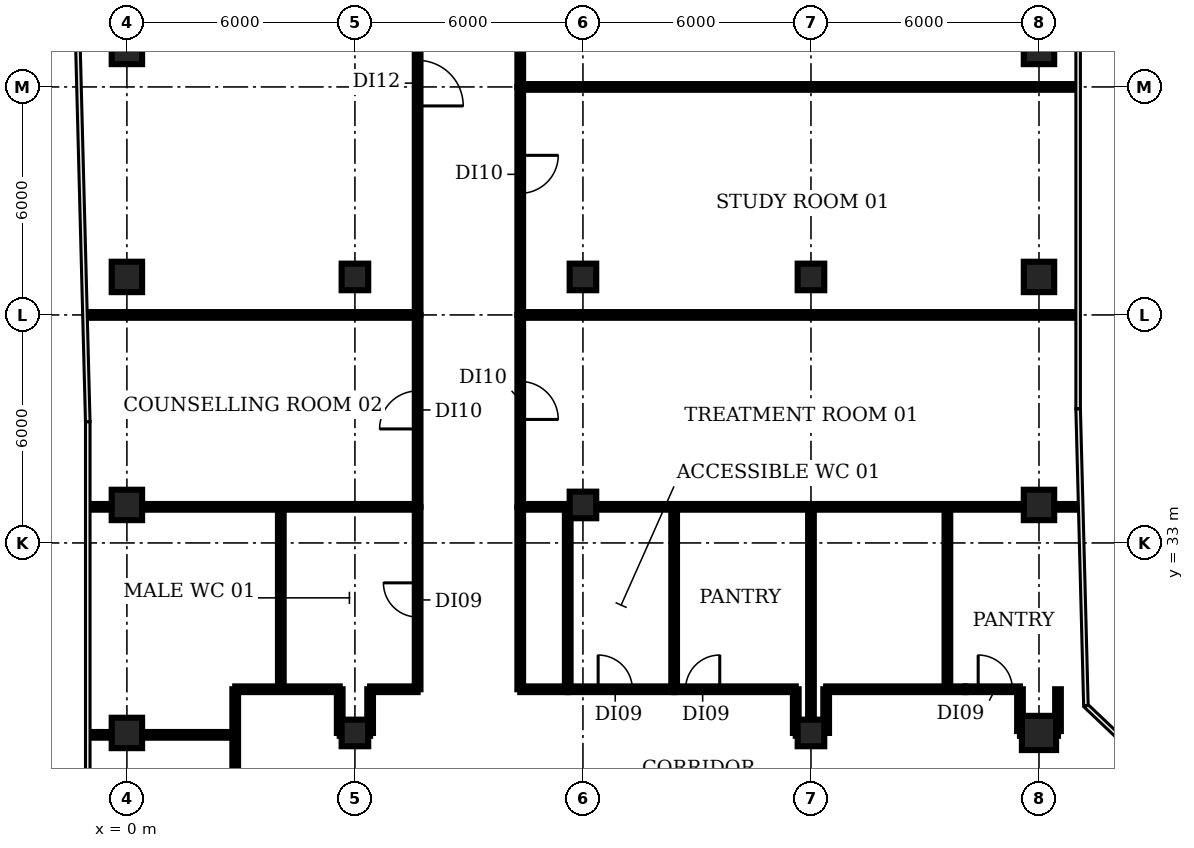
"""IFC4 building model, lengths in metres.
Left out: names, types, materials, properties, quantities, classifications, styles, units other than length and angle.
Written with IfcOpenShell. Run it as: python <this file> out.ifc"""

import sys

from ifc_helpers import new_model, si_unit, direction, frame, frame_2d, origin, origin_2d, place, context, subcontext, project, spatial, rectangle, circle, extrude, element, fill, save


model = new_model("IFC4")
c1 = context("Model", 3, precision=1e-05, world=origin(), true_north=direction((0.0, 1.0)))
c2 = subcontext(c1, "Body", "Model", "MODEL_VIEW")
j1 = project(units=[si_unit("LENGTHUNIT", "METRE"), si_unit("PLANEANGLEUNIT", "RADIAN")], contexts=[c1])
p1 = place(None, origin())
s1 = spatial("IfcSite", under=j1, at=p1, CompositionType="ELEMENT")
p2 = place(p1, origin())
s2 = spatial("IfcBuilding", under=s1, at=p2, CompositionType="ELEMENT")
p3 = place(p2, frame((0.0, 0.0, 222.2)))
s3 = spatial("IfcBuildingStorey", under=s2, at=p3, CompositionType="ELEMENT", Elevation=222.2)
for number, where, z_axis, x_axis in (
    (1, (0.0, 28.0, 0.0), (0.0, 0.0, 1.0), (1.0, 0.0, 0.0)),
    (2, (0.0, 34.0, 0.0), (0.0, 0.0, 1.0), (1.0, 0.0, 0.0)),
    (3, (0.0, 40.0, 0.0), (0.0, 0.0, 1.0), (1.0, 0.0, 0.0)),
    (4, (0.0, 46.0, 0.0), (0.0, 0.0, 1.0), (1.0, 0.0, 0.0)),
):
    element("IfcColumn", number, at=place(p3, frame(where, z_axis=z_axis, x_axis=x_axis)), inside=s3, PredefinedType="COLUMN", context=c2, shape_type="SweptSolid", body=[
        extrude(rectangle(XDim=0.8, YDim=0.8, at=origin_2d()), origin(), (0.0, 0.0, 1.0), 3.85),
    ])
for number, where, z_axis, x_axis in (
    (5, (6.0, 28.0, 0.0), (0.0, 0.0, 1.0), (1.0, 0.0, 0.0)),
    (6, (6.0, 40.0, 0.0), (0.0, 0.0, 1.0), (1.0, 0.0, 0.0)),
    (7, (12.0, 34.0, 0.0), (0.0, 0.0, 1.0), (1.0, 0.0, 0.0)),
    (8, (12.0, 40.0, 0.0), (0.0, 0.0, 1.0), (1.0, 0.0, 0.0)),
    (9, (18.0, 28.0, 0.0), (0.0, 0.0, 1.0), (1.0, 0.0, 0.0)),
    (10, (18.0, 40.0, 0.0), (0.0, 0.0, 1.0), (1.0, 0.0, 0.0)),
):
    element("IfcColumn", number, at=place(p3, frame(where, z_axis=z_axis, x_axis=x_axis)), inside=s3, PredefinedType="COLUMN", context=c2, shape_type="SweptSolid", body=[
        extrude(rectangle(XDim=0.7, YDim=0.7, at=origin_2d()), origin(), (0.0, 0.0, 1.0), 3.85),
    ])
p4 = place(p3, frame((24.0, 28.0, 0.0), z_axis=(0.0, 0.0, 1.0), x_axis=(1.0, 0.0, 0.0)))
e11 = element("IfcColumn", 11, at=p4, inside=s3, PredefinedType="COLUMN", context=c2, shape_type="SweptSolid", body=[
    extrude(circle(Radius=0.45, at=origin_2d()), origin(), (0.0, 0.0, 1.0), 3.85),
])
for number, where, z_axis, x_axis in (
    (12, (24.0, 34.0, 0.0), (0.0, 0.0, 1.0), (1.0, 0.0, 0.0)),
    (13, (24.0, 40.0, 0.0), (0.0, 0.0, 1.0), (1.0, 0.0, 0.0)),
    (14, (24.0, 46.0, 0.0), (0.0, 0.0, 1.0), (1.0, 0.0, 0.0)),
):
    element("IfcColumn", number, at=place(p3, frame(where, z_axis=z_axis, x_axis=x_axis)), inside=s3, PredefinedType="COLUMN", context=c2, shape_type="SweptSolid", body=[
        extrude(rectangle(XDim=0.8, YDim=0.8, at=origin_2d()), origin(), (0.0, 0.0, 1.0), 3.85),
    ])
p5 = place(p3, frame((-1.05, 39.0, 0.0), z_axis=(0.0, 0.0, 1.0), x_axis=(1.0, 0.0, 0.0)))
e15 = element("IfcWall", 15, at=p5, inside=s3, PredefinedType="PARTITIONING", context=c2, shape_type="SweptSolid", body=[
    extrude(rectangle(XDim=8.7, YDim=0.15, at=frame_2d((4.35, 0.0))), origin(), (0.0, 0.0, 1.0), 2.88),
])
p6 = place(p3, frame((-0.98, 27.95, 0.0), z_axis=(0.0, 0.0, 1.0), x_axis=(1.0, 0.0, 0.0)))
e16 = element("IfcWall", 16, at=p6, inside=s3, PredefinedType="PARTITIONING", context=c2, shape_type="SweptSolid", body=[
    extrude(rectangle(XDim=3.83, YDim=0.15, at=frame_2d((1.915, 0.0))), origin(), (0.0, 0.0, 1.0), 2.88),
])
p7 = place(p3, frame((-0.98, 33.95, 0.0), z_axis=(0.0, 0.0, 1.0), x_axis=(1.0, 0.0, 0.0)))
e17 = element("IfcWall", 17, at=p7, inside=s3, PredefinedType="PARTITIONING", context=c2, shape_type="SweptSolid", body=[
    extrude(rectangle(XDim=8.63, YDim=0.15, at=frame_2d((4.315, 0.0))), origin(), (0.0, 0.0, 1.0), 2.88),
])
p8 = place(p3, frame((2.85, 25.25, 0.0), z_axis=(0.0, 0.0, 1.0), x_axis=(0.0, 1.0, 0.0)))
e18 = element("IfcWall", 18, at=p8, inside=s3, PredefinedType="PARTITIONING", context=c2, shape_type="SweptSolid", body=[
    extrude(rectangle(XDim=3.9, YDim=0.15, at=frame_2d((1.95, 0.0))), origin(), (0.0, 0.0, 1.0), 2.88),
])
p9 = place(p3, frame((2.85, 29.15, 0.0), z_axis=(0.0, 0.0, 1.0), x_axis=(1.0, 0.0, 0.0)))
e19 = element("IfcWall", 19, at=p9, inside=s3, PredefinedType="PARTITIONING", context=c2, shape_type="SweptSolid", body=[
    extrude(rectangle(XDim=2.75, YDim=0.15, at=frame_2d((1.375, 0.0))), origin(), (0.0, 0.0, 1.0), 2.88),
])
p10 = place(p3, frame((4.05, 29.15, 0.0), z_axis=(0.0, 0.0, 1.0), x_axis=(0.0, 1.0, 0.0)))
e20 = element("IfcWall", 20, at=p10, inside=s3, PredefinedType="PARTITIONING", context=c2, shape_type="SweptSolid", body=[
    extrude(rectangle(XDim=4.8, YDim=0.15, at=frame_2d((2.4, 0.0))), origin(), (0.0, 0.0, 1.0), 2.88),
])
p11 = place(p3, frame((5.6, 28.0, 0.0), z_axis=(0.0, 0.0, 1.0), x_axis=(0.0, 1.0, 0.0)))
e21 = element("IfcWall", 21, at=p11, inside=s3, PredefinedType="PARTITIONING", context=c2, shape_type="SweptSolid", body=[
    extrude(rectangle(XDim=1.15, YDim=0.15, at=frame_2d((0.575, 0.0))), origin(), (0.0, 0.0, 1.0), 2.88),
])
p12 = place(p3, frame((5.6, 28.0, 0.0), z_axis=(0.0, 0.0, 1.0), x_axis=(1.0, 0.0, 0.0)))
e22 = element("IfcWall", 22, at=p12, inside=s3, PredefinedType="PARTITIONING", context=c2, shape_type="SweptSolid", body=[
    extrude(rectangle(XDim=0.8, YDim=0.15, at=frame_2d((0.4, 0.0))), origin(), (0.0, 0.0, 1.0), 2.88),
])
p13 = place(p3, frame((6.4, 28.0, 0.0), z_axis=(0.0, 0.0, 1.0), x_axis=(0.0, 1.0, 0.0)))
e23 = element("IfcWall", 23, at=p13, inside=s3, PredefinedType="PARTITIONING", context=c2, shape_type="SweptSolid", body=[
    extrude(rectangle(XDim=1.15, YDim=0.15, at=frame_2d((0.575, 0.0))), origin(), (0.0, 0.0, 1.0), 2.88),
])
p14 = place(p3, frame((6.4, 29.15, 0.0), z_axis=(0.0, 0.0, 1.0), x_axis=(1.0, 0.0, 0.0)))
e24 = element("IfcWall", 24, at=p14, inside=s3, PredefinedType="PARTITIONING", context=c2, shape_type="SweptSolid", body=[
    extrude(rectangle(XDim=1.25, YDim=0.15, at=frame_2d((0.625, 0.0))), origin(), (0.0, 0.0, 1.0), 2.88),
])
p15 = place(p3, frame((7.65, 29.15, 0.0), z_axis=(0.0, 0.0, 1.0), x_axis=(0.0, 1.0, 0.0)))
e25 = element("IfcWall", 25, at=p15, inside=s3, PredefinedType="PARTITIONING", context=c2, shape_type="SweptSolid", body=[
    extrude(rectangle(XDim=4.8, YDim=0.15, at=frame_2d((2.4, 0.0))), origin(), (0.0, 0.0, 1.0), 2.88),
])
p16 = place(p15, frame((1.9, 0.0, 0.0)))
e26 = element("IfcOpeningElement", 26, at=p16, cuts=e25, PredefinedType="OPENING", context=c2, shape_type="SweptSolid", body=[
    extrude(rectangle(XDim=0.9, YDim=2.1, at=frame_2d((0.45, 1.05))), frame((0.0, 0.085, 0.0), z_axis=(0.0, -1.0, 0.0), x_axis=(1.0, 0.0, 0.0)), (0.0, 0.0, 1.0), 0.17),
])
p17 = place(p3, frame((7.65, 33.95, 0.0), z_axis=(0.0, 0.0, 1.0), x_axis=(0.0, 1.0, 0.0)))
e27 = element("IfcWall", 27, at=p17, inside=s3, PredefinedType="PARTITIONING", context=c2, shape_type="SweptSolid", body=[
    extrude(rectangle(XDim=5.05, YDim=0.15, at=frame_2d((2.525, 0.0))), origin(), (0.0, 0.0, 1.0), 2.88),
])
p18 = place(p17, frame((2.05, 0.0, 0.0)))
e28 = element("IfcOpeningElement", 28, at=p18, cuts=e27, PredefinedType="OPENING", context=c2, shape_type="SweptSolid", body=[
    extrude(rectangle(XDim=1.0, YDim=2.1, at=frame_2d((0.5, 1.05))), frame((0.0, 0.085, 0.0), z_axis=(0.0, -1.0, 0.0), x_axis=(1.0, 0.0, 0.0)), (0.0, 0.0, 1.0), 0.17),
])
p19 = place(p3, frame((7.65, 51.0, 0.0), z_axis=(0.0, 0.0, 1.0), x_axis=(0.0, -1.0, 0.0)))
e29 = element("IfcWall", 29, at=p19, inside=s3, PredefinedType="PARTITIONING", context=c2, shape_type="SweptSolid", body=[
    extrude(rectangle(XDim=12.0, YDim=0.15, at=frame_2d((6.0, 0.0))), origin(), (0.0, 0.0, 1.0), 2.88),
])
p20 = place(p19, frame((5.3, 0.0, 0.0)))
e30 = element("IfcOpeningElement", 30, at=p20, cuts=e29, PredefinedType="OPENING", context=c2, shape_type="SweptSolid", body=[
    extrude(rectangle(XDim=1.2, YDim=2.1, at=frame_2d((0.6, 1.05))), frame((0.0, 0.085, 0.0), z_axis=(0.0, -1.0, 0.0), x_axis=(1.0, 0.0, 0.0)), (0.0, 0.0, 1.0), 0.17),
])
p21 = place(p3, frame((10.35, 29.15, 0.0), z_axis=(0.0, 0.0, 1.0), x_axis=(0.0, 1.0, 0.0)))
e31 = element("IfcWall", 31, at=p21, inside=s3, PredefinedType="PARTITIONING", context=c2, shape_type="SweptSolid", body=[
    extrude(rectangle(XDim=4.8, YDim=0.15, at=frame_2d((2.4, 0.0))), origin(), (0.0, 0.0, 1.0), 2.88),
])
p22 = place(p3, frame((10.35, 29.15, 0.0), z_axis=(0.0, 0.0, 1.0), x_axis=(1.0, 0.0, 0.0)))
e32 = element("IfcWall", 32, at=p22, inside=s3, PredefinedType="PARTITIONING", context=c2, shape_type="SweptSolid", body=[
    extrude(rectangle(XDim=1.25, YDim=0.15, at=frame_2d((0.625, 0.0))), origin(), (0.0, 0.0, 1.0), 2.88),
])
p23 = place(p3, frame((10.35, 33.95, 0.0), z_axis=(0.0, 0.0, 1.0), x_axis=(1.0, 0.0, 0.0)))
e33 = element("IfcWall", 33, at=p23, inside=s3, PredefinedType="PARTITIONING", context=c2, shape_type="SweptSolid", body=[
    extrude(rectangle(XDim=1.242, YDim=0.15, at=frame_2d((0.621, 0.0))), origin(), (0.0, 0.0, 1.0), 2.88),
])
p24 = place(p3, frame((10.35, 39.0, 0.0), z_axis=(0.0, 0.0, 1.0), x_axis=(0.0, -1.0, 0.0)))
e34 = element("IfcWall", 34, at=p24, inside=s3, PredefinedType="PARTITIONING", context=c2, shape_type="SweptSolid", body=[
    extrude(rectangle(XDim=5.05, YDim=0.15, at=frame_2d((2.525, 0.0))), origin(), (0.0, 0.0, 1.0), 2.88),
])
p25 = place(p24, frame((1.75, 0.0, 0.0)))
e35 = element("IfcOpeningElement", 35, at=p25, cuts=e34, PredefinedType="OPENING", context=c2, shape_type="SweptSolid", body=[
    extrude(rectangle(XDim=1.0, YDim=2.1, at=frame_2d((0.5, 1.05))), frame((0.0, 0.085, 0.0), z_axis=(0.0, -1.0, 0.0), x_axis=(1.0, 0.0, 0.0)), (0.0, 0.0, 1.0), 0.17),
])
p26 = place(p3, frame((10.35, 39.0, 0.0), z_axis=(0.0, 0.0, 1.0), x_axis=(1.0, 0.0, 0.0)))
e36 = element("IfcWall", 36, at=p26, inside=s3, PredefinedType="PARTITIONING", context=c2, shape_type="SweptSolid", body=[
    extrude(rectangle(XDim=14.63, YDim=0.15, at=frame_2d((7.315, 0.0))), origin(), (0.0, 0.0, 1.0), 2.88),
])
p27 = place(p3, frame((10.35, 45.0, 0.0), z_axis=(0.0, 0.0, 1.0), x_axis=(0.0, -1.0, 0.0)))
e37 = element("IfcWall", 37, at=p27, inside=s3, PredefinedType="PARTITIONING", context=c2, shape_type="SweptSolid", body=[
    extrude(rectangle(XDim=6.0, YDim=0.15, at=frame_2d((3.0, 0.0))), origin(), (0.0, 0.0, 1.0), 2.88),
])
p28 = place(p27, frame((1.8, 0.0, 0.0)))
e38 = element("IfcOpeningElement", 38, at=p28, cuts=e37, PredefinedType="OPENING", context=c2, shape_type="SweptSolid", body=[
    extrude(rectangle(XDim=1.0, YDim=2.1, at=frame_2d((0.5, 1.05))), frame((0.0, 0.085, 0.0), z_axis=(0.0, -1.0, 0.0), x_axis=(1.0, 0.0, 0.0)), (0.0, 0.0, 1.0), 0.17),
])
p29 = place(p3, frame((10.35, 45.0, 0.0), z_axis=(0.0, 0.0, 1.0), x_axis=(0.0, 1.0, 0.0)))
e39 = element("IfcWall", 39, at=p29, inside=s3, PredefinedType="PARTITIONING", context=c2, shape_type="SweptSolid", body=[
    extrude(rectangle(XDim=12.0, YDim=0.15, at=frame_2d((6.0, 0.0))), origin(), (0.0, 0.0, 1.0), 2.88),
])
p30 = place(p29, frame((5.3, 0.0, 0.0)))
e40 = element("IfcOpeningElement", 40, at=p30, cuts=e39, PredefinedType="OPENING", context=c2, shape_type="SweptSolid", body=[
    extrude(rectangle(XDim=1.2, YDim=2.1, at=frame_2d((0.6, 1.05))), frame((0.0, 0.085, 0.0), z_axis=(0.0, -1.0, 0.0), x_axis=(1.0, 0.0, 0.0)), (0.0, 0.0, 1.0), 0.17),
])
p31 = place(p3, frame((10.35, 45.0, 0.0), z_axis=(0.0, 0.0, 1.0), x_axis=(1.0, 0.0, 0.0)))
e41 = element("IfcWall", 41, at=p31, inside=s3, PredefinedType="PARTITIONING", context=c2, shape_type="SweptSolid", body=[
    extrude(rectangle(XDim=14.63, YDim=0.15, at=frame_2d((7.315, 0.0))), origin(), (0.0, 0.0, 1.0), 2.88),
])
p32 = place(p3, frame((11.6, 29.15, 0.0), z_axis=(0.0, 0.0, 1.0), x_axis=(0.0, 1.0, 0.0)))
e42 = element("IfcWall", 42, at=p32, inside=s3, PredefinedType="PARTITIONING", context=c2, shape_type="SweptSolid", body=[
    extrude(rectangle(XDim=4.72, YDim=0.15, at=frame_2d((2.36, 0.0))), origin(), (0.0, 0.0, 1.0), 2.88),
])
p33 = place(p3, frame((11.6, 29.15, 0.0), z_axis=(0.0, 0.0, 1.0), x_axis=(1.0, 0.0, 0.0)))
e43 = element("IfcWall", 43, at=p33, inside=s3, PredefinedType="PARTITIONING", context=c2, shape_type="SweptSolid", body=[
    extrude(rectangle(XDim=2.8, YDim=0.15, at=frame_2d((1.4, 0.0))), origin(), (0.0, 0.0, 1.0), 2.88),
])
p34 = place(p33, frame((0.8, 0.0, 0.0)))
e44 = element("IfcOpeningElement", 44, at=p34, cuts=e43, PredefinedType="OPENING", context=c2, shape_type="SweptSolid", body=[
    extrude(rectangle(XDim=0.9, YDim=2.1, at=frame_2d((0.45, 1.05))), frame((0.0, 0.085, 0.0), z_axis=(0.0, -1.0, 0.0), x_axis=(1.0, 0.0, 0.0)), (0.0, 0.0, 1.0), 0.17),
])
p35 = place(p3, frame((11.696, 33.95, 0.0), z_axis=(0.0, 0.0, 1.0), x_axis=(1.0, 0.0, 0.0)))
e45 = element("IfcWall", 45, at=p35, inside=s3, PredefinedType="PARTITIONING", context=c2, shape_type="SweptSolid", body=[
    extrude(rectangle(XDim=0.621, YDim=0.15, at=frame_2d((0.311, 0.0))), origin(), (0.0, 0.0, 1.0), 2.88),
])
p36 = place(p3, frame((12.42, 33.95, 0.0), z_axis=(0.0, 0.0, 1.0), x_axis=(1.0, 0.0, 0.0)))
e46 = element("IfcWall", 46, at=p36, inside=s3, PredefinedType="PARTITIONING", context=c2, shape_type="SweptSolid", body=[
    extrude(rectangle(XDim=12.63, YDim=0.15, at=frame_2d((6.315, 0.0))), origin(), (0.0, 0.0, 1.0), 2.88),
])
p37 = place(p3, frame((14.4, 29.15, 0.0), z_axis=(0.0, 0.0, 1.0), x_axis=(0.0, 1.0, 0.0)))
e47 = element("IfcWall", 47, at=p37, inside=s3, PredefinedType="PARTITIONING", context=c2, shape_type="SweptSolid", body=[
    extrude(rectangle(XDim=4.8, YDim=0.15, at=frame_2d((2.4, 0.0))), origin(), (0.0, 0.0, 1.0), 2.88),
])
p38 = place(p3, frame((14.4, 29.15, 0.0), z_axis=(0.0, 0.0, 1.0), x_axis=(1.0, 0.0, 0.0)))
e48 = element("IfcWall", 48, at=p38, inside=s3, PredefinedType="PARTITIONING", context=c2, shape_type="SweptSolid", body=[
    extrude(rectangle(XDim=3.2, YDim=0.15, at=frame_2d((1.6, 0.0))), origin(), (0.0, 0.0, 1.0), 2.88),
])
p39 = place(p38, frame((0.3, 0.0, 0.0)))
e49 = element("IfcOpeningElement", 49, at=p39, cuts=e48, PredefinedType="OPENING", context=c2, shape_type="SweptSolid", body=[
    extrude(rectangle(XDim=0.9, YDim=2.1, at=frame_2d((0.45, 1.05))), frame((0.0, 0.085, 0.0), z_axis=(0.0, -1.0, 0.0), x_axis=(1.0, 0.0, 0.0)), (0.0, 0.0, 1.0), 0.17),
])
p40 = place(p3, frame((17.6, 28.0, 0.0), z_axis=(0.0, 0.0, 1.0), x_axis=(0.0, 1.0, 0.0)))
e50 = element("IfcWall", 50, at=p40, inside=s3, PredefinedType="PARTITIONING", context=c2, shape_type="SweptSolid", body=[
    extrude(rectangle(XDim=1.15, YDim=0.15, at=frame_2d((0.575, 0.0))), origin(), (0.0, 0.0, 1.0), 2.88),
])
p41 = place(p3, frame((17.6, 28.0, 0.0), z_axis=(0.0, 0.0, 1.0), x_axis=(1.0, 0.0, 0.0)))
e51 = element("IfcWall", 51, at=p41, inside=s3, PredefinedType="PARTITIONING", context=c2, shape_type="SweptSolid", body=[
    extrude(rectangle(XDim=0.4, YDim=0.15, at=frame_2d((0.2, 0.0))), origin(), (0.0, 0.0, 1.0), 2.88),
])
p42 = place(p3, frame((18.0, 28.0, 0.0), z_axis=(0.0, 0.0, 1.0), x_axis=(0.0, 1.0, 0.0)))
e52 = element("IfcWall", 52, at=p42, inside=s3, PredefinedType="PARTITIONING", context=c2, shape_type="SweptSolid", body=[
    extrude(rectangle(XDim=5.95, YDim=0.15, at=frame_2d((2.975, 0.0))), origin(), (0.0, 0.0, 1.0), 2.88),
])
p43 = place(p3, frame((18.4, 28.0, 0.0), z_axis=(0.0, 0.0, 1.0), x_axis=(0.0, 1.0, 0.0)))
e53 = element("IfcWall", 53, at=p43, inside=s3, PredefinedType="PARTITIONING", context=c2, shape_type="SweptSolid", body=[
    extrude(rectangle(XDim=1.15, YDim=0.15, at=frame_2d((0.575, 0.0))), origin(), (0.0, 0.0, 1.0), 2.88),
])
p44 = place(p3, frame((18.4, 29.15, 0.0), z_axis=(0.0, 0.0, 1.0), x_axis=(1.0, 0.0, 0.0)))
e54 = element("IfcWall", 54, at=p44, inside=s3, PredefinedType="PARTITIONING", context=c2, shape_type="SweptSolid", body=[
    extrude(rectangle(XDim=3.67, YDim=0.15, at=frame_2d((1.835, 0.0))), origin(), (0.0, 0.0, 1.0), 2.88),
])
p45 = place(p3, frame((21.59, 29.15, 0.0), z_axis=(0.0, 0.0, 1.0), x_axis=(0.0, 1.0, 0.0)))
e55 = element("IfcWall", 55, at=p45, inside=s3, PredefinedType="PARTITIONING", context=c2, shape_type="SweptSolid", body=[
    extrude(rectangle(XDim=4.8, YDim=0.15, at=frame_2d((2.4, 0.0))), origin(), (0.0, 0.0, 1.0), 2.88),
])
p46 = place(p3, frame((22.07, 29.15, 0.0), z_axis=(0.0, 0.0, 1.0), x_axis=(1.0, 0.0, 0.0)))
e56 = element("IfcWall", 56, at=p46, inside=s3, PredefinedType="PARTITIONING", context=c2, shape_type="SweptSolid", body=[
    extrude(rectangle(XDim=1.43, YDim=0.15, at=frame_2d((0.715, 0.0))), origin(), (0.0, 0.0, 1.0), 2.88),
])
p47 = place(p46, frame((0.33, 0.0, 0.0)))
e57 = element("IfcOpeningElement", 57, at=p47, cuts=e56, PredefinedType="OPENING", context=c2, shape_type="SweptSolid", body=[
    extrude(rectangle(XDim=0.9, YDim=2.1, at=frame_2d((0.45, 1.05))), frame((0.0, 0.085, 0.0), z_axis=(0.0, -1.0, 0.0), x_axis=(1.0, 0.0, 0.0)), (0.0, 0.0, 1.0), 0.17),
])
p48 = place(p3, frame((23.5, 28.0, 0.0), z_axis=(0.0, 0.0, 1.0), x_axis=(1.0, 0.0, 0.0)))
e58 = element("IfcWall", 58, at=p48, inside=s3, PredefinedType="PARTITIONING", context=c2, shape_type="SweptSolid", body=[
    extrude(rectangle(XDim=1.0, YDim=0.15, at=frame_2d((0.5, 0.0))), origin(), (0.0, 0.0, 1.0), 2.88),
])
for number, where, z_axis, x_axis in (
    (59, (23.5, 28.05, 0.0), (0.0, 0.0, 1.0), (0.0, 1.0, 0.0)),
    (60, (24.5, 28.05, 0.0), (0.0, 0.0, 1.0), (0.0, 1.0, 0.0)),
):
    element("IfcWall", number, at=place(p3, frame(where, z_axis=z_axis, x_axis=x_axis)), inside=s3, PredefinedType="PARTITIONING", context=c2, shape_type="SweptSolid", body=[
        extrude(rectangle(XDim=1.1, YDim=0.15, at=frame_2d((0.55, 0.0))), origin(), (0.0, 0.0, 1.0), 2.88),
    ])
p49 = place(p16, origin())
e61 = element("IfcDoor", 61, at=p49, inside=s3, OperationType="SINGLE_SWING_RIGHT", PredefinedType="DOOR", context=c2, shape_type="SweptSolid", body=[
    extrude(rectangle(XDim=0.9, YDim=2.1, at=frame_2d((0.45, 1.05))), frame((0.0, 0.025, 0.0), z_axis=(0.0, -1.0, 0.0), x_axis=(1.0, 0.0, 0.0)), (0.0, 0.0, 1.0), 0.05),
])
fill(e26, e61)
p50 = place(p18, origin())
e62 = element("IfcDoor", 62, at=p50, inside=s3, OperationType="SINGLE_SWING_LEFT", PredefinedType="DOOR", context=c2, shape_type="SweptSolid", body=[
    extrude(rectangle(XDim=1.0, YDim=2.1, at=frame_2d((0.5, 1.05))), frame((0.0, 0.025, 0.0), z_axis=(0.0, -1.0, 0.0), x_axis=(1.0, 0.0, 0.0)), (0.0, 0.0, 1.0), 0.05),
])
fill(e28, e62)
p51 = place(p20, origin())
e63 = element("IfcDoor", 63, at=p51, inside=s3, OperationType="SINGLE_SWING_RIGHT", PredefinedType="DOOR", context=c2, shape_type="SweptSolid", body=[
    extrude(rectangle(XDim=1.2, YDim=2.1, at=frame_2d((0.6, 1.05))), frame((0.0, 0.025, 0.0), z_axis=(0.0, -1.0, 0.0), x_axis=(1.0, 0.0, 0.0)), (0.0, 0.0, 1.0), 0.05),
])
fill(e30, e63)
p52 = place(p25, origin())
e64 = element("IfcDoor", 64, at=p52, inside=s3, OperationType="SINGLE_SWING_RIGHT", PredefinedType="DOOR", context=c2, shape_type="SweptSolid", body=[
    extrude(rectangle(XDim=1.0, YDim=2.1, at=frame_2d((0.5, 1.05))), frame((0.0, 0.025, 0.0), z_axis=(0.0, -1.0, 0.0), x_axis=(1.0, 0.0, 0.0)), (0.0, 0.0, 1.0), 0.05),
])
fill(e35, e64)
p53 = place(p28, origin())
e65 = element("IfcDoor", 65, at=p53, inside=s3, OperationType="SINGLE_SWING_LEFT", PredefinedType="DOOR", context=c2, shape_type="SweptSolid", body=[
    extrude(rectangle(XDim=1.0, YDim=2.1, at=frame_2d((0.5, 1.05))), frame((0.0, 0.025, 0.0), z_axis=(0.0, -1.0, 0.0), x_axis=(1.0, 0.0, 0.0)), (0.0, 0.0, 1.0), 0.05),
])
fill(e38, e65)
p54 = place(p34, origin())
e66 = element("IfcDoor", 66, at=p54, inside=s3, OperationType="SINGLE_SWING_LEFT", PredefinedType="DOOR", context=c2, shape_type="SweptSolid", body=[
    extrude(rectangle(XDim=0.9, YDim=2.1, at=frame_2d((0.45, 1.05))), frame((0.0, 0.025, 0.0), z_axis=(0.0, -1.0, 0.0), x_axis=(1.0, 0.0, 0.0)), (0.0, 0.0, 1.0), 0.05),
])
fill(e44, e66)
p55 = place(p39, origin())
e67 = element("IfcDoor", 67, at=p55, inside=s3, OperationType="SINGLE_SWING_RIGHT", PredefinedType="DOOR", context=c2, shape_type="SweptSolid", body=[
    extrude(rectangle(XDim=0.9, YDim=2.1, at=frame_2d((0.45, 1.05))), frame((0.0, 0.025, 0.0), z_axis=(0.0, -1.0, 0.0), x_axis=(1.0, 0.0, 0.0)), (0.0, 0.0, 1.0), 0.05),
])
fill(e49, e67)
p56 = place(p47, origin())
e68 = element("IfcDoor", 68, at=p56, inside=s3, OperationType="SINGLE_SWING_LEFT", PredefinedType="DOOR", context=c2, shape_type="SweptSolid", body=[
    extrude(rectangle(XDim=0.9, YDim=2.1, at=frame_2d((0.45, 1.05))), frame((0.0, 0.025, 0.0), z_axis=(0.0, -1.0, 0.0), x_axis=(1.0, 0.0, 0.0)), (0.0, 0.0, 1.0), 0.05),
])
fill(e57, e68)
save(model, sys.argv[1])
